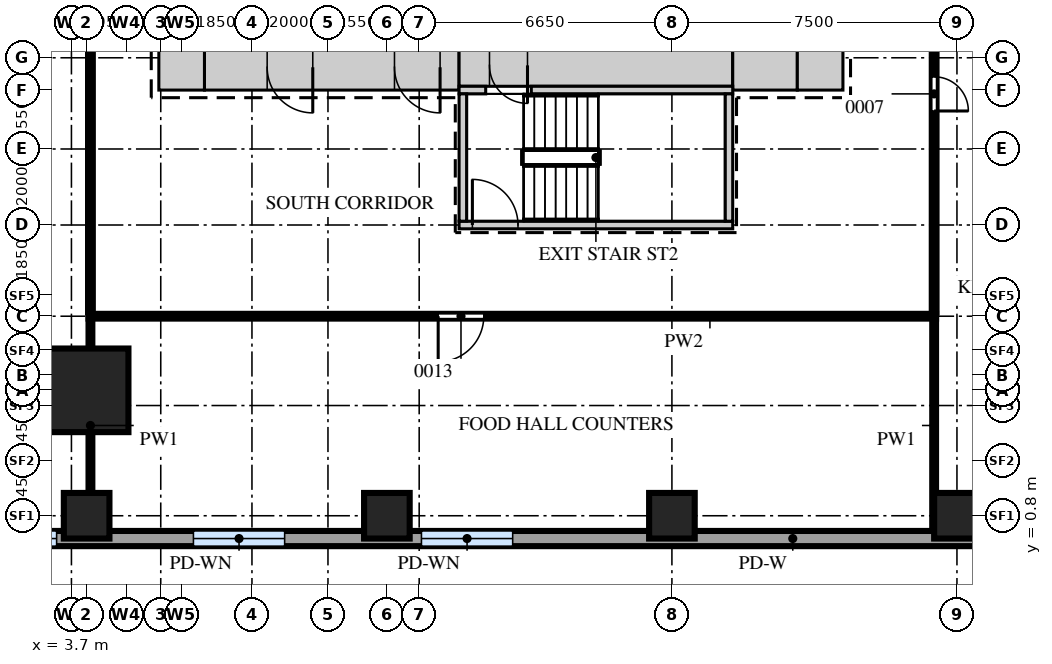
"""IFC4 building model, lengths in metres.
Left out: names, types, materials, properties, quantities, classifications, styles, units other than length and angle.
Written with IfcOpenShell. Run it as: python <this file> out.ifc"""

import sys

from ifc_helpers import new_model, si_unit, direction, frame, frame_2d, origin, origin_2d, place, context, subcontext, project, spatial, rectangle, extrude, source, transform, mapped, element, fill, save


model = new_model("IFC4")
c1 = context("Model", 3, precision=1e-05, world=origin(), true_north=direction((0.0, 1.0)))
c2 = subcontext(c1, "Body", "Model", "MODEL_VIEW")
j1 = project(units=[si_unit("LENGTHUNIT", "METRE"), si_unit("PLANEANGLEUNIT", "RADIAN")], contexts=[c1])
p1 = place(None, origin())
s1 = spatial("IfcSite", under=j1, at=p1, CompositionType="ELEMENT")
p2 = place(p1, origin())
s2 = spatial("IfcBuilding", under=s1, at=p2, CompositionType="ELEMENT")
p3 = place(p2, frame((0.0, 0.0, 13.0)))
s3 = spatial("IfcBuildingStorey", under=s2, at=p3, CompositionType="ELEMENT", Elevation=13.0)
m1 = source(origin(), c2, "Body", "SweptSolid", [
    extrude(rectangle(XDim=6.7, YDim=1.2, at=frame_2d((3.35, 0.0))), origin(), (0.0, 0.0, 1.0), 5.2),
])
p4 = place(p3, frame((7.2, 12.6, 0.0), z_axis=(0.0, 0.0, 1.0), x_axis=(1.0, 0.0, 0.0)))
e1 = element("IfcWall", 1, at=p4, inside=s3, PredefinedType="SHEAR", context=c2, shape_type="MappedRepresentation", body=[
    mapped(m1, transform((0.0, 0.0, 0.0))),
])
m2 = source(origin(), c2, "Body", "SweptSolid", [
    extrude(rectangle(XDim=1.2, YDim=2.1, at=frame_2d((0.6, 1.05))), frame((0.0, 0.61, 0.0), z_axis=(0.0, -1.0, 0.0), x_axis=(1.0, 0.0, 0.0)), (0.0, 0.0, 1.0), 1.22),
])
p5 = place(p4, frame((5.0, 0.0, 0.0)))
e2 = element("IfcOpeningElement", 2, at=p5, cuts=e1, PredefinedType="OPENING", context=c2, shape_type="MappedRepresentation", body=[
    mapped(m2, transform((0.0, 0.0, 0.0))),
])
p6 = place(p4, frame((1.65, 0.0, 0.0)))
e3 = element("IfcOpeningElement", 3, at=p6, cuts=e1, PredefinedType="OPENING", context=c2, shape_type="MappedRepresentation", body=[
    mapped(m2, transform((0.0, 0.0, 0.0))),
])
m3 = source(origin(), c2, "Body", "SweptSolid", [
    extrude(rectangle(XDim=7.2, YDim=1.1, at=frame_2d((3.6, 0.0))), origin(), (0.0, 0.0, 1.0), 5.2),
])
p7 = place(p3, frame((13.9, 12.65, 0.0), z_axis=(0.0, 0.0, 1.0), x_axis=(1.0, 0.0, 0.0)))
e4 = element("IfcWall", 4, at=p7, inside=s3, PredefinedType="SHEAR", context=c2, shape_type="MappedRepresentation", body=[
    mapped(m3, transform((0.0, 0.0, 0.0))),
])
m4 = source(origin(), c2, "Body", "SweptSolid", [
    extrude(rectangle(XDim=1.0, YDim=2.1, at=frame_2d((0.5, 1.05))), frame((0.0, 0.56, 0.0), z_axis=(0.0, -1.0, 0.0), x_axis=(1.0, 0.0, 0.0)), (0.0, 0.0, 1.0), 1.12),
])
p8 = place(p7, frame((0.8, 0.0, 0.0)))
e5 = element("IfcOpeningElement", 5, at=p8, cuts=e4, PredefinedType="OPENING", context=c2, shape_type="MappedRepresentation", body=[
    mapped(m4, transform((0.0, 0.0, 0.0))),
])
m5 = source(origin(), c2, "Body", "SweptSolid", [
    extrude(rectangle(XDim=1.7, YDim=1.2, at=frame_2d((0.85, 0.0))), origin(), (0.0, 0.0, 1.0), 5.2),
])
p9 = place(p3, frame((21.1, 12.6, 0.0), z_axis=(0.0, 0.0, 1.0), x_axis=(1.0, 0.0, 0.0)))
e6 = element("IfcWall", 6, at=p9, inside=s3, PredefinedType="SHEAR", context=c2, shape_type="MappedRepresentation", body=[
    mapped(m5, transform((0.0, 0.0, 0.0))),
])
m6 = source(origin(), c2, "Body", "SweptSolid", [
    extrude(rectangle(XDim=1.2, YDim=1.2, at=frame_2d((0.6, 0.0))), origin(), (0.0, 0.0, 1.0), 5.2),
])
for number, where, z_axis, x_axis in (
    (7, (22.8, 12.6, 0.0), (0.0, 0.0, 1.0), (1.0, 0.0, 0.0)),
    (8, (6.0, 12.6, 0.0), (0.0, 0.0, 1.0), (1.0, 0.0, 0.0)),
):
    element("IfcWall", number, at=place(p3, frame(where, z_axis=z_axis, x_axis=x_axis)), inside=s3, PredefinedType="SHEAR", context=c2, shape_type="MappedRepresentation", body=[
        mapped(m6, transform((0.0, 0.0, 0.0))),
    ])
m7 = source(origin(), c2, "Body", "SweptSolid", [
    extrude(rectangle(XDim=0.7, YDim=0.2, at=frame_2d((0.35, 0.0))), origin(), (0.0, 0.0, 1.0), 5.2),
])
p10 = place(p3, frame((13.9, 12.0, 0.0), z_axis=(0.0, 0.0, 1.0), x_axis=(1.0, 0.0, 0.0)))
e9 = element("IfcWall", 9, at=p10, inside=s3, PredefinedType="SHEAR", context=c2, shape_type="MappedRepresentation", body=[
    mapped(m7, transform((0.0, 0.0, 0.0))),
])
m8 = source(origin(), c2, "Body", "SweptSolid", [
    extrude(rectangle(XDim=5.3, YDim=0.2, at=frame_2d((2.65, 0.0))), origin(), (0.0, 0.0, 1.0), 5.2),
])
p11 = place(p3, frame((15.8, 12.0, 0.0), z_axis=(0.0, 0.0, 1.0), x_axis=(1.0, 0.0, 0.0)))
e10 = element("IfcWall", 10, at=p11, inside=s3, PredefinedType="SHEAR", context=c2, shape_type="MappedRepresentation", body=[
    mapped(m8, transform((0.0, 0.0, 0.0))),
])
m9 = source(origin(), c2, "Body", "SweptSolid", [
    extrude(rectangle(XDim=7.2, YDim=0.2, at=frame_2d((3.6, 0.0))), origin(), (0.0, 0.0, 1.0), 5.2),
])
p12 = place(p3, frame((13.9, 8.45, 0.0), z_axis=(0.0, 0.0, 1.0), x_axis=(1.0, 0.0, 0.0)))
e11 = element("IfcWall", 11, at=p12, inside=s3, PredefinedType="SHEAR", context=c2, shape_type="MappedRepresentation", body=[
    mapped(m9, transform((0.0, 0.0, 0.0))),
])
m10 = source(origin(), c2, "Body", "SweptSolid", [
    extrude(rectangle(XDim=1.2, YDim=2.1, at=frame_2d((0.6, 1.05))), frame((0.0, 0.11, 0.0), z_axis=(0.0, -1.0, 0.0), x_axis=(1.0, 0.0, 0.0)), (0.0, 0.0, 1.0), 0.22),
])
p13 = place(p12, frame((0.35, 0.0, 0.0)))
e12 = element("IfcOpeningElement", 12, at=p13, cuts=e11, PredefinedType="OPENING", context=c2, shape_type="MappedRepresentation", body=[
    mapped(m10, transform((0.0, 0.0, 0.0))),
])
m11 = source(origin(), c2, "Body", "SweptSolid", [
    extrude(rectangle(XDim=3.35, YDim=0.2, at=frame_2d((1.675, 0.0))), origin(), (0.0, 0.0, 1.0), 5.2),
])
for number, where, z_axis, x_axis in (
    (13, (21.0, 8.55, 0.0), (0.0, 0.0, 1.0), (0.0, 1.0, 0.0)),
    (14, (14.0, 8.55, 0.0), (0.0, 0.0, 1.0), (0.0, 1.0, 0.0)),
):
    element("IfcWall", number, at=place(p3, frame(where, z_axis=z_axis, x_axis=x_axis)), inside=s3, PredefinedType="SHEAR", context=c2, shape_type="MappedRepresentation", body=[
        mapped(m11, transform((0.0, 0.0, 0.0))),
    ])
m12 = source(origin(), c2, "Body", "SweptSolid", [
    extrude(rectangle(XDim=2.2, YDim=2.2, at=origin_2d()), origin(), (0.0, 0.0, 1.0), 5.2),
])
p14 = place(p3, frame((4.1, 4.1, 0.0), z_axis=(0.0, 0.0, 1.0), x_axis=(1.0, 0.0, 0.0)))
e15 = element("IfcColumn", 15, at=p14, inside=s3, PredefinedType="COLUMN", context=c2, shape_type="MappedRepresentation", body=[
    mapped(m12, transform((0.0, 0.0, 0.0))),
])
m13 = source(origin(), c2, "Body", "SweptSolid", [
    extrude(rectangle(XDim=1.2, YDim=1.2, at=origin_2d()), origin(), (0.0, 0.0, 1.0), 5.2),
])
for number, where, z_axis, x_axis in (
    (16, (4.1, 0.8, 0.0), (0.0, 0.0, 1.0), (1.0, 0.0, 0.0)),
    (17, (12.0, 0.8, 0.0), (0.0, 0.0, 1.0), (1.0, 0.0, 0.0)),
    (18, (19.5, 0.8, 0.0), (0.0, 0.0, 1.0), (1.0, 0.0, 0.0)),
    (19, (27.0, 0.8, 0.0), (0.0, 0.0, 1.0), (1.0, 0.0, 0.0)),
):
    element("IfcColumn", number, at=place(p3, frame(where, z_axis=z_axis, x_axis=x_axis)), inside=s3, PredefinedType="COLUMN", context=c2, shape_type="MappedRepresentation", body=[
        mapped(m13, transform((0.0, 0.0, 0.0))),
    ])
m14 = source(origin(), c2, "Body", "SweptSolid", [
    extrude(rectangle(XDim=31.84, YDim=0.4, at=frame_2d((15.92, 0.0))), origin(), (0.0, 0.0, 1.0), 5.2),
])
p15 = place(p3, frame((-1.79, 0.2, 0.0), z_axis=(0.0, 0.0, 1.0), x_axis=(1.0, 0.0, 0.0)))
e20 = element("IfcWall", 20, at=p15, inside=s3, PredefinedType="SOLIDWALL", context=c2, shape_type="MappedRepresentation", body=[
    mapped(m14, transform((0.0, 0.0, 0.0))),
])
m15 = source(origin(), c2, "Body", "SweptSolid", [
    extrude(rectangle(XDim=2.4, YDim=2.4, at=frame_2d((1.2, 1.2))), frame((0.0, 0.21, 0.0), z_axis=(0.0, -1.0, 0.0), x_axis=(1.0, 0.0, 0.0)), (0.0, 0.0, 1.0), 0.42),
])
p16 = place(p15, frame((2.7, 0.0, 1.0)))
e21 = element("IfcOpeningElement", 21, at=p16, cuts=e20, PredefinedType="OPENING", context=c2, shape_type="MappedRepresentation", body=[
    mapped(m15, transform((0.0, 0.0, 0.0))),
])
p17 = place(p15, frame((8.7, 0.0, 1.0)))
e22 = element("IfcOpeningElement", 22, at=p17, cuts=e20, PredefinedType="OPENING", context=c2, shape_type="MappedRepresentation", body=[
    mapped(m15, transform((0.0, 0.0, 0.0))),
])
p18 = place(p15, frame((14.7, 0.0, 1.0)))
e23 = element("IfcOpeningElement", 23, at=p18, cuts=e20, PredefinedType="OPENING", context=c2, shape_type="MappedRepresentation", body=[
    mapped(m15, transform((0.0, 0.0, 0.0))),
])
m16 = source(origin(), c2, "Body", "SweptSolid", [
    extrude(rectangle(XDim=5.55, YDim=0.1, at=frame_2d((2.775, 0.0))), origin(), (0.0, 0.0, 1.0), 5.2),
])
for number, where, z_axis, x_axis in (
    (24, (4.2, 0.4, 0.0), (0.0, 0.0, 1.0), (0.0, 1.0, 0.0)),
    (25, (26.4, 0.4, 0.0), (0.0, 0.0, 1.0), (0.0, 1.0, 0.0)),
):
    element("IfcWall", number, at=place(p3, frame(where, z_axis=z_axis, x_axis=x_axis)), inside=s3, PredefinedType="PARTITIONING", context=c2, shape_type="MappedRepresentation", body=[
        mapped(m16, transform((0.0, 0.0, 0.0))),
    ])
m17 = source(origin(), c2, "Body", "SweptSolid", [
    extrude(rectangle(XDim=22.3, YDim=0.125, at=frame_2d((11.15, 0.0))), origin(), (0.0, 0.0, 1.0), 5.2),
])
p19 = place(p3, frame((4.15, 6.05, 0.0), z_axis=(0.0, 0.0, 1.0), x_axis=(1.0, 0.0, 0.0)))
e26 = element("IfcWall", 26, at=p19, inside=s3, PredefinedType="PARTITIONING", context=c2, shape_type="MappedRepresentation", body=[
    mapped(m17, transform((0.0, 0.0, 0.0))),
])
m18 = source(origin(), c2, "Body", "SweptSolid", [
    extrude(rectangle(XDim=1.2, YDim=2.1, at=frame_2d((0.6, 1.05))), frame((0.0, 0.073, 0.0), z_axis=(0.0, -1.0, 0.0), x_axis=(1.0, 0.0, 0.0)), (0.0, 0.0, 1.0), 0.145),
])
p20 = place(p19, frame((9.2, 0.0, 0.0)))
e27 = element("IfcOpeningElement", 27, at=p20, cuts=e26, PredefinedType="OPENING", context=c2, shape_type="MappedRepresentation", body=[
    mapped(m18, transform((0.0, 0.0, 0.0))),
])
m19 = source(origin(), c2, "Body", "SweptSolid", [
    extrude(rectangle(XDim=41.8, YDim=0.125, at=frame_2d((20.9, 0.0))), origin(), (0.0, 0.0, 1.0), 5.2),
])
p21 = place(p3, frame((4.2, 6.15, 0.0), z_axis=(0.0, 0.0, 1.0), x_axis=(0.0, 1.0, 0.0)))
e28 = element("IfcWall", 28, at=p21, inside=s3, PredefinedType="PARTITIONING", context=c2, shape_type="MappedRepresentation", body=[
    mapped(m19, transform((0.0, 0.0, 0.0))),
])
p22 = place(p21, frame((7.1, 0.0, 0.0)))
e29 = element("IfcOpeningElement", 29, at=p22, cuts=e28, PredefinedType="OPENING", context=c2, shape_type="MappedRepresentation", body=[
    mapped(m18, transform((0.0, 0.0, 0.0))),
])
p23 = place(p21, frame((25.85, 0.0, 0.0)))
e30 = element("IfcOpeningElement", 30, at=p23, cuts=e28, PredefinedType="OPENING", context=c2, shape_type="MappedRepresentation", body=[
    mapped(m18, transform((0.0, 0.0, 0.0))),
])
m20 = source(origin(), c2, "Body", "SweptSolid", [
    extrude(rectangle(XDim=27.15, YDim=0.125, at=frame_2d((13.575, 0.0))), origin(), (0.0, 0.0, 1.0), 5.2),
])
p24 = place(p3, frame((26.4, 6.15, 0.0), z_axis=(0.0, 0.0, 1.0), x_axis=(0.0, 1.0, 0.0)))
e31 = element("IfcWall", 31, at=p24, inside=s3, PredefinedType="PARTITIONING", context=c2, shape_type="MappedRepresentation", body=[
    mapped(m20, transform((0.0, 0.0, 0.0))),
])
m21 = source(origin(), c2, "Body", "SweptSolid", [
    extrude(rectangle(XDim=0.9, YDim=2.1, at=frame_2d((0.45, 1.05))), frame((0.0, 0.073, 0.0), z_axis=(0.0, -1.0, 0.0), x_axis=(1.0, 0.0, 0.0)), (0.0, 0.0, 1.0), 0.145),
])
p25 = place(p24, frame((5.3, 0.0, 0.0)))
e32 = element("IfcOpeningElement", 32, at=p25, cuts=e31, PredefinedType="OPENING", context=c2, shape_type="MappedRepresentation", body=[
    mapped(m21, transform((0.0, 0.0, 0.0))),
])
m22 = source(origin(), c2, "Body", "SweptSolid", [
    extrude(rectangle(XDim=2.4, YDim=2.4, at=frame_2d((1.2, 1.2))), frame((0.0, 0.03, 0.0), z_axis=(0.0, -1.0, 0.0), x_axis=(1.0, 0.0, 0.0)), (0.0, 0.0, 1.0), 0.06),
])
p26 = place(p16, origin())
e33 = element("IfcWindow", 33, at=p26, inside=s3, PartitioningType="SINGLE_PANEL", PredefinedType="WINDOW", context=c2, shape_type="MappedRepresentation", body=[
    mapped(m22, transform((0.0, 0.0, 0.0))),
])
fill(e21, e33)
p27 = place(p17, origin())
e34 = element("IfcWindow", 34, at=p27, inside=s3, PartitioningType="SINGLE_PANEL", PredefinedType="WINDOW", context=c2, shape_type="MappedRepresentation", body=[
    mapped(m22, transform((0.0, 0.0, 0.0))),
])
fill(e22, e34)
p28 = place(p18, origin())
e35 = element("IfcWindow", 35, at=p28, inside=s3, PartitioningType="SINGLE_PANEL", PredefinedType="WINDOW", context=c2, shape_type="MappedRepresentation", body=[
    mapped(m22, transform((0.0, 0.0, 0.0))),
])
fill(e23, e35)
m23 = source(origin(), c2, "Body", "SweptSolid", [
    extrude(rectangle(XDim=1.2, YDim=2.1, at=frame_2d((0.6, 1.05))), frame((0.0, 0.55, 0.0), z_axis=(0.0, -1.0, 0.0), x_axis=(1.0, 0.0, 0.0)), (0.0, 0.0, 1.0), 1.1),
])
p29 = place(p5, origin())
e36 = element("IfcDoor", 36, at=p29, inside=s3, OperationType="SINGLE_SWING_RIGHT", PredefinedType="DOOR", context=c2, shape_type="MappedRepresentation", body=[
    mapped(m23, transform((0.0, 0.0, 0.0))),
])
fill(e2, e36)
p30 = place(p6, origin())
e37 = element("IfcDoor", 37, at=p30, inside=s3, OperationType="SINGLE_SWING_RIGHT", PredefinedType="DOOR", context=c2, shape_type="MappedRepresentation", body=[
    mapped(m23, transform((0.0, 0.0, 0.0))),
])
fill(e3, e37)
m24 = source(origin(), c2, "Body", "SweptSolid", [
    extrude(rectangle(XDim=1.0, YDim=2.1, at=frame_2d((0.5, 1.05))), frame((0.0, 0.5, 0.0), z_axis=(0.0, -1.0, 0.0), x_axis=(1.0, 0.0, 0.0)), (0.0, 0.0, 1.0), 1.0),
])
p31 = place(p8, origin())
e38 = element("IfcDoor", 38, at=p31, inside=s3, OperationType="SINGLE_SWING_RIGHT", PredefinedType="DOOR", context=c2, shape_type="MappedRepresentation", body=[
    mapped(m24, transform((0.0, 0.0, 0.0))),
])
fill(e5, e38)
m25 = source(origin(), c2, "Body", "SweptSolid", [
    extrude(rectangle(XDim=0.9, YDim=2.1, at=frame_2d((0.45, 1.05))), frame((0.0, 0.025, 0.0), z_axis=(0.0, -1.0, 0.0), x_axis=(1.0, 0.0, 0.0)), (0.0, 0.0, 1.0), 0.05),
])
p32 = place(p25, origin())
e39 = element("IfcDoor", 39, at=p32, inside=s3, OperationType="SINGLE_SWING_LEFT", PredefinedType="DOOR", context=c2, shape_type="MappedRepresentation", body=[
    mapped(m25, transform((0.0, 0.0, 0.0))),
])
fill(e32, e39)
m26 = source(origin(), c2, "Body", "SweptSolid", [
    extrude(rectangle(XDim=1.2, YDim=2.1, at=frame_2d((0.6, 1.05))), frame((0.0, 0.025, 0.0), z_axis=(0.0, -1.0, 0.0), x_axis=(1.0, 0.0, 0.0)), (0.0, 0.0, 1.0), 0.05),
])
p33 = place(p20, origin())
e40 = element("IfcDoor", 40, at=p33, inside=s3, OperationType="SINGLE_SWING_LEFT", PredefinedType="DOOR", context=c2, shape_type="MappedRepresentation", body=[
    mapped(m26, transform((0.0, 0.0, 0.0))),
])
fill(e27, e40)
p34 = place(p13, origin())
e41 = element("IfcDoor", 41, at=p34, inside=s3, OperationType="SINGLE_SWING_RIGHT", PredefinedType="DOOR", context=c2, shape_type="MappedRepresentation", body=[
    mapped(m26, transform((0.0, 0.0, 0.0))),
])
fill(e12, e41)
save(model, sys.argv[1])
